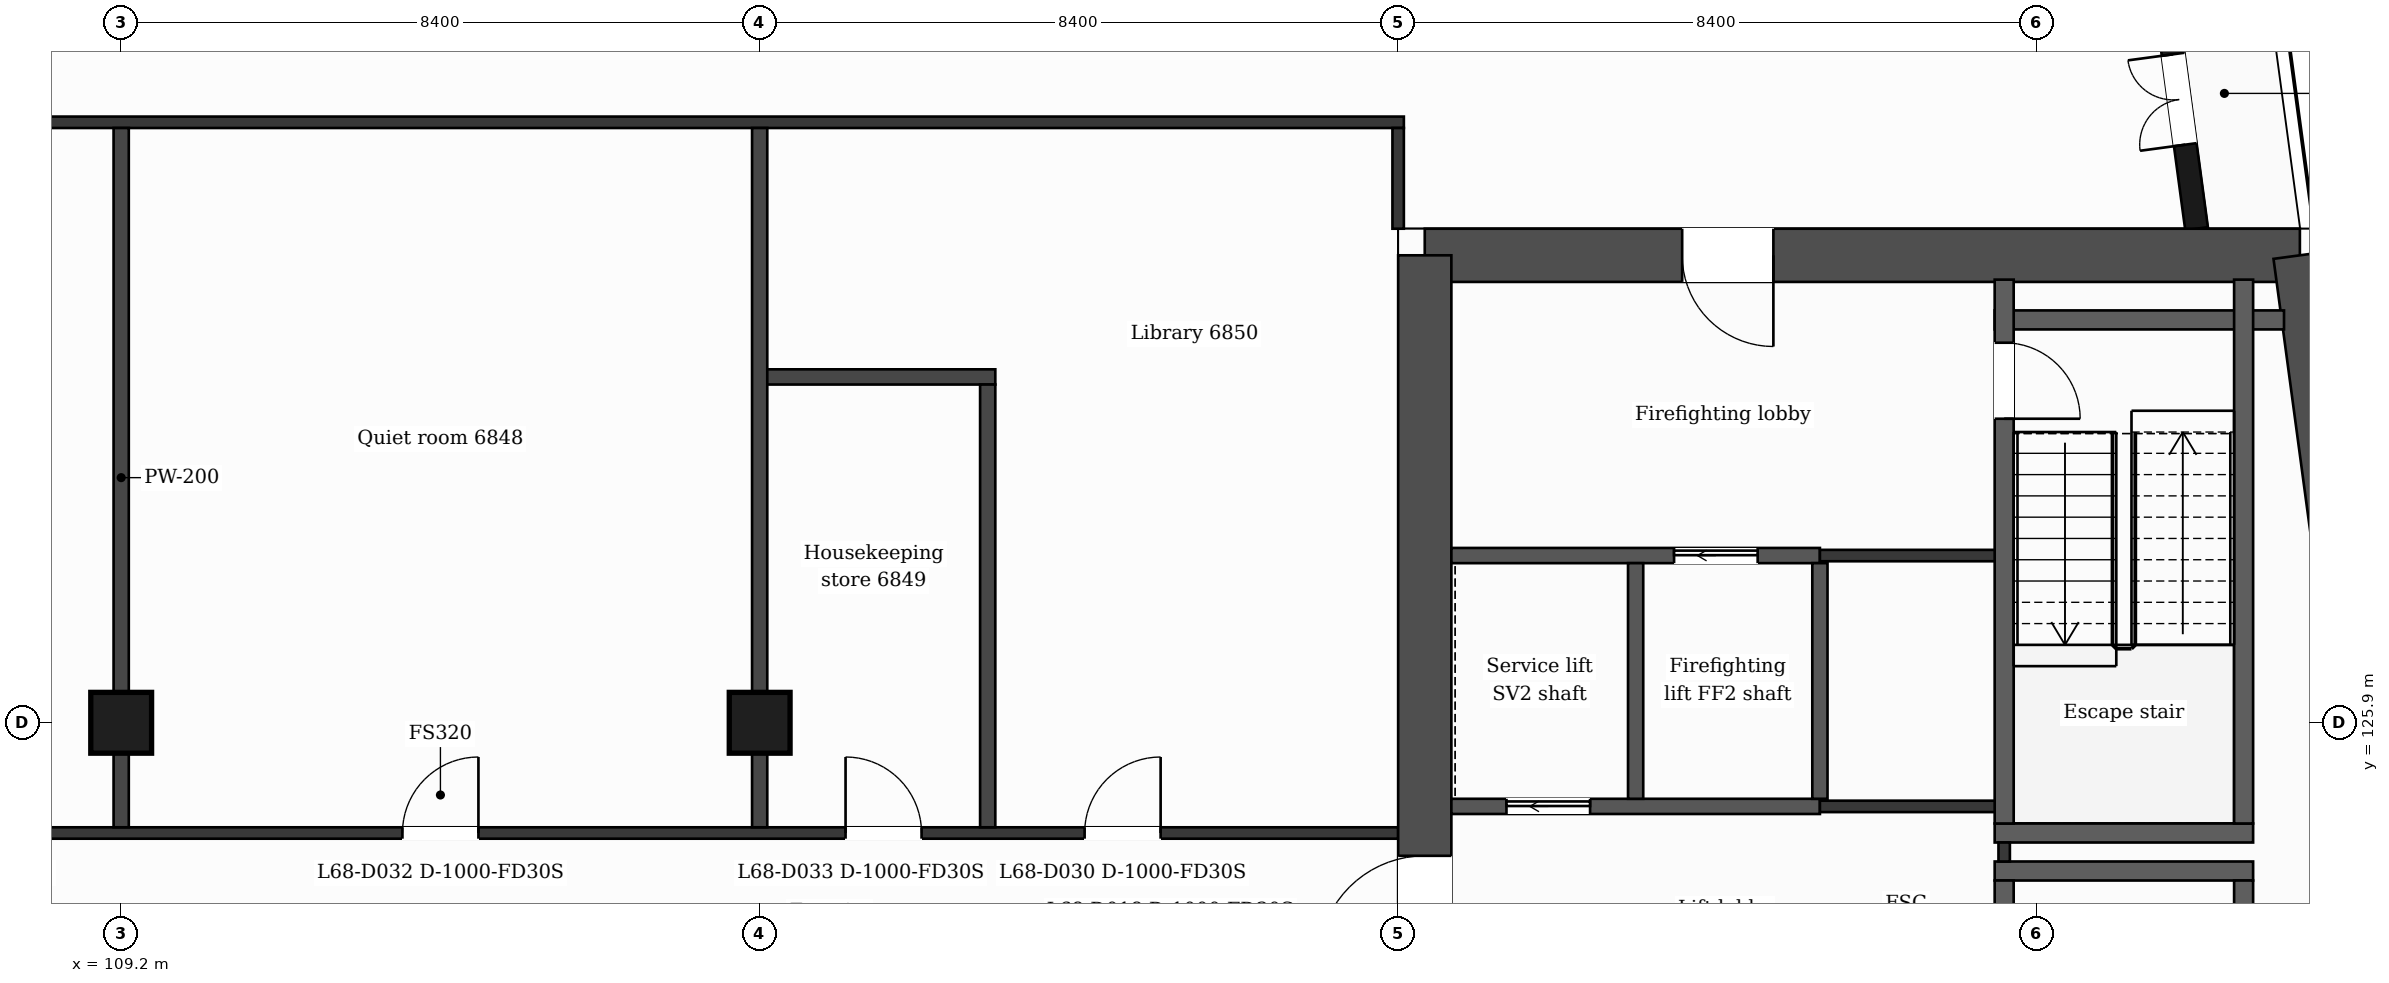
"""IFC4 building model, lengths in metres.
Left out: names, types, materials, properties, quantities, classifications, styles, units other than length and angle.
Written with IfcOpenShell. Run it as: python <this file> out.ifc"""

import sys

from ifc_helpers import new_model, si_unit, direction, frame, frame_2d, origin, origin_2d, place, context, subcontext, project, spatial, rectangle, extrude, element, fill, save


model = new_model("IFC4")
c1 = context("Model", 3, precision=1e-05, world=origin(), true_north=direction((0.0, 1.0)))
c2 = subcontext(c1, "Body", "Model", "MODEL_VIEW")
j1 = project(units=[si_unit("LENGTHUNIT", "METRE"), si_unit("PLANEANGLEUNIT", "RADIAN")], contexts=[c1])
p1 = place(None, origin())
s1 = spatial("IfcSite", under=j1, at=p1, CompositionType="ELEMENT")
p2 = place(p1, origin())
s2 = spatial("IfcBuilding", under=s1, at=p2, CompositionType="ELEMENT")
p3 = place(p2, frame((0.0, 0.0, 281.2)))
s3 = spatial("IfcBuildingStorey", under=s2, at=p3, CompositionType="ELEMENT", Elevation=281.2)
p4 = place(p3, frame((126.35, 132.05, 0.0), z_axis=(0.0, 0.0, 1.0), x_axis=(1.0, 0.0, 0.0)))
e1 = element("IfcWall", 1, at=p4, inside=s3, PredefinedType="SHEAR", context=c2, shape_type="SweptSolid", body=[
    extrude(rectangle(XDim=11.513, YDim=0.7, at=frame_2d((5.757, 0.0))), origin(), (0.0, 0.0, 1.0), 3.7),
])
p5 = place(p4, frame((3.386, 0.0, 0.0)))
e2 = element("IfcOpeningElement", 2, at=p5, cuts=e1, PredefinedType="OPENING", context=c2, shape_type="SweptSolid", body=[
    extrude(rectangle(XDim=1.2, YDim=2.1, at=frame_2d((0.6, 1.05))), frame((0.0, 0.36, 0.0), z_axis=(0.0, -1.0, 0.0), x_axis=(1.0, 0.0, 0.0)), (0.0, 0.0, 1.0), 0.72),
])
p6 = place(p3, frame((137.863, 132.05, 0.0), z_axis=(0.0, 0.0, 1.0), x_axis=(0.133401241494, -0.991062111458, 0.0)))
e3 = element("IfcWall", 3, at=p6, inside=s3, PredefinedType="SHEAR", context=c2, shape_type="SweptSolid", body=[
    extrude(rectangle(XDim=15.842, YDim=0.7, at=frame_2d((7.921, 0.0))), origin(), (0.0, 0.0, 1.0), 3.7),
])
p7 = place(p3, frame((126.35, 116.35, 0.0), z_axis=(0.0, 0.0, 1.0), x_axis=(0.0, 1.0, 0.0)))
e4 = element("IfcWall", 4, at=p7, inside=s3, PredefinedType="SHEAR", context=c2, shape_type="SweptSolid", body=[
    extrude(rectangle(XDim=15.7, YDim=0.7, at=frame_2d((7.85, 0.0))), origin(), (0.0, 0.0, 1.0), 3.7),
])
p8 = place(p7, frame((6.4, 0.0, 0.0)))
e5 = element("IfcOpeningElement", 5, at=p8, cuts=e4, PredefinedType="OPENING", context=c2, shape_type="SweptSolid", body=[
    extrude(rectangle(XDim=1.4, YDim=2.1, at=frame_2d((0.7, 1.05))), frame((0.0, 0.36, 0.0), z_axis=(0.0, -1.0, 0.0), x_axis=(1.0, 0.0, 0.0)), (0.0, 0.0, 1.0), 0.72),
])
for number, where, z_axis, x_axis in (
    (6, (109.2, 125.9, 0.0), (0.0, 0.0, 1.0), (1.0, 0.0, 0.0)),
    (7, (117.6, 125.9, 0.0), (0.0, 0.0, 1.0), (1.0, 0.0, 0.0)),
):
    element("IfcColumn", number, at=place(p3, frame(where, z_axis=z_axis, x_axis=x_axis)), inside=s3, PredefinedType="COLUMN", context=c2, shape_type="SweptSolid", body=[
        extrude(rectangle(XDim=0.8, YDim=0.8, at=origin_2d()), origin(), (0.0, 0.0, 1.0), 3.7),
    ])
p9 = place(p3, frame((136.504, 132.4, 0.0), z_axis=(0.0, 0.0, 1.0), x_axis=(-0.133399697462, 0.99106231929, 0.0)))
e8 = element("IfcWall", 8, at=p9, inside=s3, PredefinedType="SOLIDWALL", context=c2, shape_type="SweptSolid", body=[
    extrude(rectangle(XDim=6.74, YDim=0.3, at=frame_2d((3.37, 0.0))), origin(), (0.0, 0.0, 1.0), 3.38),
])
p10 = place(p9, frame((1.115, 0.0, 0.0)))
e9 = element("IfcOpeningElement", 9, at=p10, cuts=e8, PredefinedType="OPENING", context=c2, shape_type="SweptSolid", body=[
    extrude(rectangle(XDim=1.2, YDim=2.4, at=frame_2d((0.6, 1.2))), frame((0.0, 0.16, 0.0), z_axis=(0.0, -1.0, 0.0), x_axis=(1.0, 0.0, 0.0)), (0.0, 0.0, 1.0), 0.32),
])
p11 = place(p9, frame((3.835, 0.0, 0.9)))
e10 = element("IfcOpeningElement", 10, at=p11, cuts=e8, PredefinedType="OPENING", context=c2, shape_type="SweptSolid", body=[
    extrude(rectangle(XDim=2.4, YDim=2.1, at=frame_2d((1.2, 1.05))), frame((0.0, 0.16, 0.0), z_axis=(0.0, -1.0, 0.0), x_axis=(1.0, 0.0, 0.0)), (0.0, 0.0, 1.0), 0.32),
])
for number, where, z_axis, x_axis in (
    (11, (133.848, 123.95, 0.0), (0.0, 0.0, 1.0), (1.0, 0.0, 0.0)),
    (12, (133.848, 124.45, 0.0), (0.0, 0.0, 1.0), (1.0, 0.0, 0.0)),
):
    element("IfcWall", number, at=place(p3, frame(where, z_axis=z_axis, x_axis=x_axis)), inside=s3, PredefinedType="PARTITIONING", context=c2, shape_type="SweptSolid", body=[
        extrude(rectangle(XDim=3.4, YDim=0.25, at=frame_2d((1.7, 0.0))), origin(), (0.0, 0.0, 1.0), 3.38),
    ])
p12 = place(p3, frame((100.8, 124.45, 0.0), z_axis=(0.0, 0.0, 1.0), x_axis=(1.0, 0.0, 0.0)))
e13 = element("IfcWall", 13, at=p12, inside=s3, PredefinedType="PARTITIONING", context=c2, shape_type="SweptSolid", body=[
    extrude(rectangle(XDim=25.2, YDim=0.15, at=frame_2d((12.6, 0.0))), origin(), (0.0, 0.0, 1.0), 3.38),
])
p13 = place(p12, frame((21.075, 0.0, 0.0)))
e14 = element("IfcOpeningElement", 14, at=p13, cuts=e13, PredefinedType="OPENING", context=c2, shape_type="SweptSolid", body=[
    extrude(rectangle(XDim=1.0, YDim=2.1, at=frame_2d((0.5, 1.05))), frame((0.0, 0.085, 0.0), z_axis=(0.0, -1.0, 0.0), x_axis=(1.0, 0.0, 0.0)), (0.0, 0.0, 1.0), 0.17),
])
p14 = place(p12, frame((5.375, 0.0, 0.0)))
e15 = element("IfcOpeningElement", 15, at=p14, cuts=e13, PredefinedType="OPENING", context=c2, shape_type="SweptSolid", body=[
    extrude(rectangle(XDim=1.0, YDim=2.1, at=frame_2d((0.5, 1.05))), frame((0.0, 0.085, 0.0), z_axis=(0.0, -1.0, 0.0), x_axis=(1.0, 0.0, 0.0)), (0.0, 0.0, 1.0), 0.17),
])
p15 = place(p12, frame((12.1, 0.0, 0.0)))
e16 = element("IfcOpeningElement", 16, at=p15, cuts=e13, PredefinedType="OPENING", context=c2, shape_type="SweptSolid", body=[
    extrude(rectangle(XDim=1.0, YDim=2.1, at=frame_2d((0.5, 1.05))), frame((0.0, 0.085, 0.0), z_axis=(0.0, -1.0, 0.0), x_axis=(1.0, 0.0, 0.0)), (0.0, 0.0, 1.0), 0.17),
])
p16 = place(p12, frame((17.93, 0.0, 0.0)))
e17 = element("IfcOpeningElement", 17, at=p16, cuts=e13, PredefinedType="OPENING", context=c2, shape_type="SweptSolid", body=[
    extrude(rectangle(XDim=1.0, YDim=2.1, at=frame_2d((0.5, 1.05))), frame((0.0, 0.085, 0.0), z_axis=(0.0, -1.0, 0.0), x_axis=(1.0, 0.0, 0.0)), (0.0, 0.0, 1.0), 0.17),
])
p17 = place(p3, frame((126.7, 124.8, 0.0), z_axis=(0.0, 0.0, 1.0), x_axis=(1.0, 0.0, 0.0)))
e18 = element("IfcWall", 18, at=p17, inside=s3, PredefinedType="PARTITIONING", context=c2, shape_type="SweptSolid", body=[
    extrude(rectangle(XDim=4.849, YDim=0.2, at=frame_2d((2.424, 0.0))), origin(), (0.0, 0.0, 1.0), 3.38),
])
p18 = place(p17, frame((0.725, 0.0, 0.0)))
e19 = element("IfcOpeningElement", 19, at=p18, cuts=e18, PredefinedType="OPENING", context=c2, shape_type="SweptSolid", body=[
    extrude(rectangle(XDim=1.1, YDim=2.1, at=frame_2d((0.55, 1.05))), frame((0.0, 0.11, 0.0), z_axis=(0.0, -1.0, 0.0), x_axis=(1.0, 0.0, 0.0)), (0.0, 0.0, 1.0), 0.22),
])
p19 = place(p3, frame((131.549, 124.8, 0.0), z_axis=(0.0, 0.0, 1.0), x_axis=(1.0, 0.0, 0.0)))
e20 = element("IfcWall", 20, at=p19, inside=s3, PredefinedType="PARTITIONING", context=c2, shape_type="SweptSolid", body=[
    extrude(rectangle(XDim=2.549, YDim=0.15, at=frame_2d((1.275, 0.0))), origin(), (0.0, 0.0, 1.0), 3.38),
])
p20 = place(p3, frame((126.7, 128.1, 0.0), z_axis=(0.0, 0.0, 1.0), x_axis=(1.0, 0.0, 0.0)))
e21 = element("IfcWall", 21, at=p20, inside=s3, PredefinedType="PARTITIONING", context=c2, shape_type="SweptSolid", body=[
    extrude(rectangle(XDim=4.849, YDim=0.2, at=frame_2d((2.424, 0.0))), origin(), (0.0, 0.0, 1.0), 3.38),
])
p21 = place(p20, frame((2.93, 0.0, 0.0)))
e22 = element("IfcOpeningElement", 22, at=p21, cuts=e21, PredefinedType="OPENING", context=c2, shape_type="SweptSolid", body=[
    extrude(rectangle(XDim=1.1, YDim=2.1, at=frame_2d((0.55, 1.05))), frame((0.0, 0.11, 0.0), z_axis=(0.0, -1.0, 0.0), x_axis=(1.0, 0.0, 0.0)), (0.0, 0.0, 1.0), 0.22),
])
p22 = place(p3, frame((131.549, 128.1, 0.0), z_axis=(0.0, 0.0, 1.0), x_axis=(1.0, 0.0, 0.0)))
e23 = element("IfcWall", 23, at=p22, inside=s3, PredefinedType="PARTITIONING", context=c2, shape_type="SweptSolid", body=[
    extrude(rectangle(XDim=2.424, YDim=0.15, at=frame_2d((1.212, 0.0))), origin(), (0.0, 0.0, 1.0), 3.38),
])
p23 = place(p3, frame((117.6, 130.45, 0.0), z_axis=(0.0, 0.0, 1.0), x_axis=(1.0, 0.0, 0.0)))
e24 = element("IfcWall", 24, at=p23, inside=s3, PredefinedType="PARTITIONING", context=c2, shape_type="SweptSolid", body=[
    extrude(rectangle(XDim=3.1, YDim=0.2, at=frame_2d((1.55, 0.0))), origin(), (0.0, 0.0, 1.0), 3.38),
])
p24 = place(p3, frame((133.848, 131.2, 0.0), z_axis=(0.0, 0.0, 1.0), x_axis=(1.0, 0.0, 0.0)))
e25 = element("IfcWall", 25, at=p24, inside=s3, PredefinedType="PARTITIONING", context=c2, shape_type="SweptSolid", body=[
    extrude(rectangle(XDim=3.807, YDim=0.25, at=frame_2d((1.903, 0.0))), origin(), (0.0, 0.0, 1.0), 3.38),
])
p25 = place(p3, frame((100.725, 133.8, 0.0), z_axis=(0.0, 0.0, 1.0), x_axis=(1.0, 0.0, 0.0)))
e26 = element("IfcWall", 26, at=p25, inside=s3, PredefinedType="PARTITIONING", context=c2, shape_type="SweptSolid", body=[
    extrude(rectangle(XDim=25.35, YDim=0.15, at=frame_2d((12.675, 0.0))), origin(), (0.0, 0.0, 1.0), 3.38),
])
for number, where, z_axis, x_axis in (
    (27, (109.2, 124.525, 0.0), (0.0, 0.0, 1.0), (0.0, 1.0, 0.0)),
    (28, (117.6, 124.525, 0.0), (0.0, 0.0, 1.0), (0.0, 1.0, 0.0)),
):
    element("IfcWall", number, at=place(p3, frame(where, z_axis=z_axis, x_axis=x_axis)), inside=s3, PredefinedType="PARTITIONING", context=c2, shape_type="SweptSolid", body=[
        extrude(rectangle(XDim=9.2, YDim=0.2, at=frame_2d((4.6, 0.0))), origin(), (0.0, 0.0, 1.0), 3.38),
    ])
p26 = place(p3, frame((120.6, 124.525, 0.0), z_axis=(0.0, 0.0, 1.0), x_axis=(0.0, 1.0, 0.0)))
e29 = element("IfcWall", 29, at=p26, inside=s3, PredefinedType="PARTITIONING", context=c2, shape_type="SweptSolid", body=[
    extrude(rectangle(XDim=5.825, YDim=0.2, at=frame_2d((2.913, 0.0))), origin(), (0.0, 0.0, 1.0), 3.38),
])
p27 = place(p3, frame((126.0, 132.4, 0.0), z_axis=(0.0, 0.0, 1.0), x_axis=(0.0, 1.0, 0.0)))
e30 = element("IfcWall", 30, at=p27, inside=s3, PredefinedType="PARTITIONING", context=c2, shape_type="SweptSolid", body=[
    extrude(rectangle(XDim=1.325, YDim=0.15, at=frame_2d((0.663, 0.0))), origin(), (0.0, 0.0, 1.0), 3.38),
])
for number, where, z_axis, x_axis in (
    (31, (129.124, 124.9, 0.0), (0.0, 0.0, 1.0), (0.0, 1.0, 0.0)),
    (32, (131.549, 124.9, 0.0), (0.0, 0.0, 1.0), (0.0, 1.0, 0.0)),
):
    element("IfcWall", number, at=place(p3, frame(where, z_axis=z_axis, x_axis=x_axis)), inside=s3, PredefinedType="PARTITIONING", context=c2, shape_type="SweptSolid", body=[
        extrude(rectangle(XDim=3.1, YDim=0.2, at=frame_2d((1.55, 0.0))), origin(), (0.0, 0.0, 1.0), 3.38),
    ])
p28 = place(p3, frame((133.973, 124.075, 0.0), z_axis=(0.0, 0.0, 1.0), x_axis=(0.0, 1.0, 0.0)))
e33 = element("IfcWall", 33, at=p28, inside=s3, PredefinedType="PARTITIONING", context=c2, shape_type="SweptSolid", body=[
    extrude(rectangle(XDim=0.25, YDim=0.15, at=frame_2d((0.125, 0.0))), origin(), (0.0, 0.0, 1.0), 3.38),
])
p29 = place(p3, frame((133.973, 116.67, 0.0), z_axis=(0.0, 0.0, 1.0), x_axis=(0.0, 1.0, 0.0)))
e34 = element("IfcWall", 34, at=p29, inside=s3, PredefinedType="PARTITIONING", context=c2, shape_type="SweptSolid", body=[
    extrude(rectangle(XDim=7.155, YDim=0.25, at=frame_2d((3.578, 0.0))), origin(), (0.0, 0.0, 1.0), 3.38),
])
p30 = place(p29, frame((5.855, 0.0, 0.0)))
e35 = element("IfcOpeningElement", 35, at=p30, cuts=e34, PredefinedType="OPENING", context=c2, shape_type="SweptSolid", body=[
    extrude(rectangle(XDim=0.95, YDim=2.1, at=frame_2d((0.475, 1.05))), frame((0.0, 0.135, 0.0), z_axis=(0.0, -1.0, 0.0), x_axis=(1.0, 0.0, 0.0)), (0.0, 0.0, 1.0), 0.27),
])
p31 = place(p3, frame((133.973, 124.575, 0.0), z_axis=(0.0, 0.0, 1.0), x_axis=(0.0, 1.0, 0.0)))
e36 = element("IfcWall", 36, at=p31, inside=s3, PredefinedType="PARTITIONING", context=c2, shape_type="SweptSolid", body=[
    extrude(rectangle(XDim=7.155, YDim=0.25, at=frame_2d((3.578, 0.0))), origin(), (0.0, 0.0, 1.0), 3.38),
])
p32 = place(p31, frame((5.325, 0.0, 0.0)))
e37 = element("IfcOpeningElement", 37, at=p32, cuts=e36, PredefinedType="OPENING", context=c2, shape_type="SweptSolid", body=[
    extrude(rectangle(XDim=1.0, YDim=2.1, at=frame_2d((0.5, 1.05))), frame((0.0, 0.135, 0.0), z_axis=(0.0, -1.0, 0.0), x_axis=(1.0, 0.0, 0.0)), (0.0, 0.0, 1.0), 0.27),
])
for number, where, z_axis, x_axis in (
    (38, (137.123, 116.67, 0.0), (0.0, 0.0, 1.0), (0.0, 1.0, 0.0)),
    (39, (137.123, 124.575, 0.0), (0.0, 0.0, 1.0), (0.0, 1.0, 0.0)),
):
    element("IfcWall", number, at=place(p3, frame(where, z_axis=z_axis, x_axis=x_axis)), inside=s3, PredefinedType="PARTITIONING", context=c2, shape_type="SweptSolid", body=[
        extrude(rectangle(XDim=7.155, YDim=0.25, at=frame_2d((3.578, 0.0))), origin(), (0.0, 0.0, 1.0), 3.38),
    ])
p33 = place(p10, origin())
e40 = element("IfcDoor", 40, at=p33, inside=s3, OperationType="DOUBLE_DOOR_SINGLE_SWING", PredefinedType="DOOR", context=c2, shape_type="SweptSolid", body=[
    extrude(rectangle(XDim=1.2, YDim=2.4, at=frame_2d((0.6, 1.2))), frame((0.0, 0.025, 0.0), z_axis=(0.0, -1.0, 0.0), x_axis=(1.0, 0.0, 0.0)), (0.0, 0.0, 1.0), 0.05),
])
fill(e9, e40)
p34 = place(p21, origin())
e41 = element("IfcDoor", 41, at=p34, inside=s3, OperationType="SLIDING_TO_LEFT", PredefinedType="DOOR", context=c2, shape_type="SweptSolid", body=[
    extrude(rectangle(XDim=1.1, YDim=2.1, at=frame_2d((0.55, 1.05))), frame((0.0, 0.025, 0.0), z_axis=(0.0, -1.0, 0.0), x_axis=(1.0, 0.0, 0.0)), (0.0, 0.0, 1.0), 0.05),
])
fill(e22, e41)
p35 = place(p18, origin())
e42 = element("IfcDoor", 42, at=p35, inside=s3, OperationType="SLIDING_TO_LEFT", PredefinedType="DOOR", context=c2, shape_type="SweptSolid", body=[
    extrude(rectangle(XDim=1.1, YDim=2.1, at=frame_2d((0.55, 1.05))), frame((0.0, 0.025, 0.0), z_axis=(0.0, -1.0, 0.0), x_axis=(1.0, 0.0, 0.0)), (0.0, 0.0, 1.0), 0.05),
])
fill(e19, e42)
p36 = place(p32, origin())
e43 = element("IfcDoor", 43, at=p36, inside=s3, OperationType="SINGLE_SWING_LEFT", PredefinedType="DOOR", context=c2, shape_type="SweptSolid", body=[
    extrude(rectangle(XDim=1.0, YDim=2.1, at=frame_2d((0.5, 1.05))), frame((0.0, 0.025, 0.0), z_axis=(0.0, -1.0, 0.0), x_axis=(1.0, 0.0, 0.0)), (0.0, 0.0, 1.0), 0.05),
])
fill(e37, e43)
p37 = place(p13, origin())
e44 = element("IfcDoor", 44, at=p37, inside=s3, OperationType="SINGLE_SWING_RIGHT", PredefinedType="DOOR", context=c2, shape_type="SweptSolid", body=[
    extrude(rectangle(XDim=1.0, YDim=2.1, at=frame_2d((0.5, 1.05))), frame((0.0, 0.025, 0.0), z_axis=(0.0, -1.0, 0.0), x_axis=(1.0, 0.0, 0.0)), (0.0, 0.0, 1.0), 0.05),
])
fill(e14, e44)
p38 = place(p15, origin())
e45 = element("IfcDoor", 45, at=p38, inside=s3, OperationType="SINGLE_SWING_RIGHT", PredefinedType="DOOR", context=c2, shape_type="SweptSolid", body=[
    extrude(rectangle(XDim=1.0, YDim=2.1, at=frame_2d((0.5, 1.05))), frame((0.0, 0.025, 0.0), z_axis=(0.0, -1.0, 0.0), x_axis=(1.0, 0.0, 0.0)), (0.0, 0.0, 1.0), 0.05),
])
fill(e16, e45)
p39 = place(p16, origin())
e46 = element("IfcDoor", 46, at=p39, inside=s3, OperationType="SINGLE_SWING_LEFT", PredefinedType="DOOR", context=c2, shape_type="SweptSolid", body=[
    extrude(rectangle(XDim=1.0, YDim=2.1, at=frame_2d((0.5, 1.05))), frame((0.0, 0.025, 0.0), z_axis=(0.0, -1.0, 0.0), x_axis=(1.0, 0.0, 0.0)), (0.0, 0.0, 1.0), 0.05),
])
fill(e17, e46)
p40 = place(p5, origin())
e47 = element("IfcDoor", 47, at=p40, inside=s3, OperationType="SINGLE_SWING_RIGHT", PredefinedType="DOOR", context=c2, shape_type="SweptSolid", body=[
    extrude(rectangle(XDim=1.2, YDim=2.1, at=frame_2d((0.6, 1.05))), frame((0.0, 0.025, 0.0), z_axis=(0.0, -1.0, 0.0), x_axis=(1.0, 0.0, 0.0)), (0.0, 0.0, 1.0), 0.05),
])
fill(e2, e47)
p41 = place(p8, origin())
e48 = element("IfcDoor", 48, at=p41, inside=s3, OperationType="SINGLE_SWING_LEFT", PredefinedType="DOOR", context=c2, shape_type="SweptSolid", body=[
    extrude(rectangle(XDim=1.4, YDim=2.1, at=frame_2d((0.7, 1.05))), frame((0.0, 0.025, 0.0), z_axis=(0.0, -1.0, 0.0), x_axis=(1.0, 0.0, 0.0)), (0.0, 0.0, 1.0), 0.05),
])
fill(e5, e48)
save(model, sys.argv[1])
